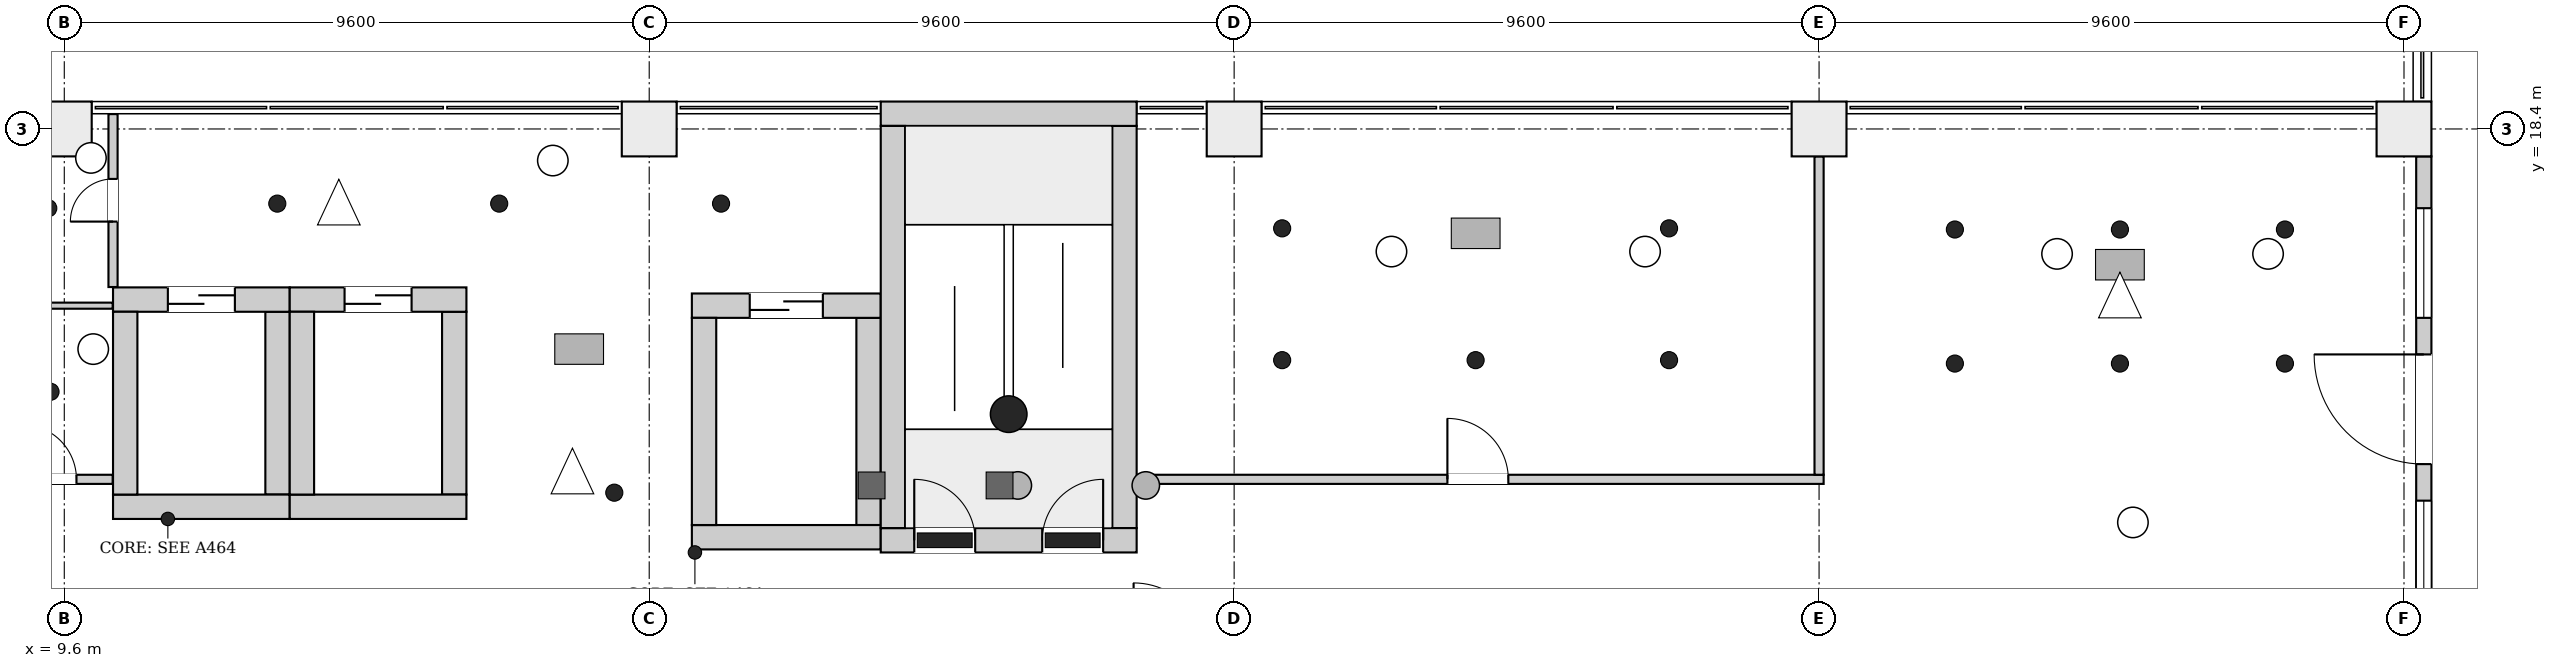
"""IFC4 building model, lengths in metres.
Left out: names, types, materials, properties, quantities, classifications, styles, units other than length and angle.
Written with IfcOpenShell. Run it as: python <this file> out.ifc"""

import sys

from ifc_helpers import new_model, si_unit, direction, frame, frame_2d, origin, origin_2d, place, context, subcontext, project, spatial, rectangle, extrude, element, fill, save


model = new_model("IFC4")
c1 = context("Model", 3, precision=1e-05, world=origin(), true_north=direction((0.0, 1.0)))
c2 = subcontext(c1, "Body", "Model", "MODEL_VIEW")
j1 = project(units=[si_unit("LENGTHUNIT", "METRE"), si_unit("PLANEANGLEUNIT", "RADIAN")], contexts=[c1])
p1 = place(None, origin())
s1 = spatial("IfcSite", under=j1, at=p1, CompositionType="ELEMENT")
p2 = place(p1, origin())
s2 = spatial("IfcBuilding", under=s1, at=p2, CompositionType="ELEMENT")
p3 = place(p2, frame((0.0, 0.0, 31.9)))
s3 = spatial("IfcBuildingStorey", under=s2, at=p3, CompositionType="ELEMENT", Elevation=31.9)
p4 = place(p3, frame((23.0, 11.65, 0.0), z_axis=(0.0, 0.0, 1.0), x_axis=(1.0, 0.0, 0.0)))
e1 = element("IfcWall", 1, at=p4, inside=s3, PredefinedType="SHEAR", context=c2, shape_type="SweptSolid", body=[
    extrude(rectangle(XDim=4.2, YDim=0.4, at=frame_2d((2.1, 0.0))), origin(), (0.0, 0.0, 1.0), 4.2),
])
p5 = place(p4, frame((0.55, 0.0, 0.0)))
e2 = element("IfcOpeningElement", 2, at=p5, cuts=e1, PredefinedType="OPENING", context=c2, shape_type="SweptSolid", body=[
    extrude(rectangle(XDim=1.0, YDim=2.1, at=frame_2d((0.5, 1.05))), frame((0.0, 0.21, 0.0), z_axis=(0.0, -1.0, 0.0), x_axis=(1.0, 0.0, 0.0)), (0.0, 0.0, 1.0), 0.42),
])
p6 = place(p4, frame((2.65, 0.0, 0.0)))
e3 = element("IfcOpeningElement", 3, at=p6, cuts=e1, PredefinedType="OPENING", context=c2, shape_type="SweptSolid", body=[
    extrude(rectangle(XDim=1.0, YDim=2.1, at=frame_2d((0.5, 1.05))), frame((0.0, 0.21, 0.0), z_axis=(0.0, -1.0, 0.0), x_axis=(1.0, 0.0, 0.0)), (0.0, 0.0, 1.0), 0.42),
])
p7 = place(p3, frame((23.0, 18.65, 0.0), z_axis=(0.0, 0.0, 1.0), x_axis=(1.0, 0.0, 0.0)))
e4 = element("IfcWall", 4, at=p7, inside=s3, PredefinedType="SHEAR", context=c2, shape_type="SweptSolid", body=[
    extrude(rectangle(XDim=4.2, YDim=0.4, at=frame_2d((2.1, 0.0))), origin(), (0.0, 0.0, 1.0), 4.2),
])
for number, where, z_axis, x_axis in (
    (5, (23.2, 11.85, 0.0), (0.0, 0.0, 1.0), (0.0, 1.0, 0.0)),
    (6, (27.0, 11.85, 0.0), (0.0, 0.0, 1.0), (0.0, 1.0, 0.0)),
):
    element("IfcWall", number, at=place(p3, frame(where, z_axis=z_axis, x_axis=x_axis)), inside=s3, PredefinedType="SHEAR", context=c2, shape_type="SweptSolid", body=[
        extrude(rectangle(XDim=6.6, YDim=0.4, at=frame_2d((3.3, 0.0))), origin(), (0.0, 0.0, 1.0), 4.2),
    ])
p8 = place(p3, frame((10.4, 12.2, 0.0), z_axis=(0.0, 0.0, 1.0), x_axis=(1.0, 0.0, 0.0)))
e7 = element("IfcWall", 7, at=p8, inside=s3, PredefinedType="SHEAR", context=c2, shape_type="SweptSolid", body=[
    extrude(rectangle(XDim=2.9, YDim=0.4, at=frame_2d((1.45, 0.0))), origin(), (0.0, 0.0, 1.0), 4.2),
])
p9 = place(p3, frame((10.4, 15.6, 0.0), z_axis=(0.0, 0.0, 1.0), x_axis=(1.0, 0.0, 0.0)))
e8 = element("IfcWall", 8, at=p9, inside=s3, PredefinedType="SHEAR", context=c2, shape_type="SweptSolid", body=[
    extrude(rectangle(XDim=2.9, YDim=0.4, at=frame_2d((1.45, 0.0))), origin(), (0.0, 0.0, 1.0), 4.2),
])
p10 = place(p9, frame((0.9, 0.0, 0.0)))
e9 = element("IfcOpeningElement", 9, at=p10, cuts=e8, PredefinedType="OPENING", context=c2, shape_type="SweptSolid", body=[
    extrude(rectangle(XDim=1.1, YDim=2.1, at=frame_2d((0.55, 1.05))), frame((0.0, 0.21, 0.0), z_axis=(0.0, -1.0, 0.0), x_axis=(1.0, 0.0, 0.0)), (0.0, 0.0, 1.0), 0.42),
])
for number, where, z_axis, x_axis in (
    (10, (10.6, 12.4, 0.0), (0.0, 0.0, 1.0), (0.0, 1.0, 0.0)),
    (11, (13.1, 12.4, 0.0), (0.0, 0.0, 1.0), (0.0, 1.0, 0.0)),
):
    element("IfcWall", number, at=place(p3, frame(where, z_axis=z_axis, x_axis=x_axis)), inside=s3, PredefinedType="SHEAR", context=c2, shape_type="SweptSolid", body=[
        extrude(rectangle(XDim=3.0, YDim=0.4, at=frame_2d((1.5, 0.0))), origin(), (0.0, 0.0, 1.0), 4.2),
    ])
p11 = place(p3, frame((13.3, 12.2, 0.0), z_axis=(0.0, 0.0, 1.0), x_axis=(1.0, 0.0, 0.0)))
e12 = element("IfcWall", 12, at=p11, inside=s3, PredefinedType="SHEAR", context=c2, shape_type="SweptSolid", body=[
    extrude(rectangle(XDim=2.9, YDim=0.4, at=frame_2d((1.45, 0.0))), origin(), (0.0, 0.0, 1.0), 4.2),
])
p12 = place(p3, frame((13.3, 15.6, 0.0), z_axis=(0.0, 0.0, 1.0), x_axis=(1.0, 0.0, 0.0)))
e13 = element("IfcWall", 13, at=p12, inside=s3, PredefinedType="SHEAR", context=c2, shape_type="SweptSolid", body=[
    extrude(rectangle(XDim=2.9, YDim=0.4, at=frame_2d((1.45, 0.0))), origin(), (0.0, 0.0, 1.0), 4.2),
])
p13 = place(p12, frame((0.9, 0.0, 0.0)))
e14 = element("IfcOpeningElement", 14, at=p13, cuts=e13, PredefinedType="OPENING", context=c2, shape_type="SweptSolid", body=[
    extrude(rectangle(XDim=1.1, YDim=2.1, at=frame_2d((0.55, 1.05))), frame((0.0, 0.21, 0.0), z_axis=(0.0, -1.0, 0.0), x_axis=(1.0, 0.0, 0.0)), (0.0, 0.0, 1.0), 0.42),
])
for number, where, z_axis, x_axis in (
    (15, (13.5, 12.4, 0.0), (0.0, 0.0, 1.0), (0.0, 1.0, 0.0)),
    (16, (16.0, 12.4, 0.0), (0.0, 0.0, 1.0), (0.0, 1.0, 0.0)),
):
    element("IfcWall", number, at=place(p3, frame(where, z_axis=z_axis, x_axis=x_axis)), inside=s3, PredefinedType="SHEAR", context=c2, shape_type="SweptSolid", body=[
        extrude(rectangle(XDim=3.0, YDim=0.4, at=frame_2d((1.5, 0.0))), origin(), (0.0, 0.0, 1.0), 4.2),
    ])
p14 = place(p3, frame((19.9, 11.7, 0.0), z_axis=(0.0, 0.0, 1.0), x_axis=(1.0, 0.0, 0.0)))
e17 = element("IfcWall", 17, at=p14, inside=s3, PredefinedType="SHEAR", context=c2, shape_type="SweptSolid", body=[
    extrude(rectangle(XDim=3.1, YDim=0.4, at=frame_2d((1.55, 0.0))), origin(), (0.0, 0.0, 1.0), 4.2),
])
p15 = place(p3, frame((19.9, 15.5, 0.0), z_axis=(0.0, 0.0, 1.0), x_axis=(1.0, 0.0, 0.0)))
e18 = element("IfcWall", 18, at=p15, inside=s3, PredefinedType="SHEAR", context=c2, shape_type="SweptSolid", body=[
    extrude(rectangle(XDim=3.1, YDim=0.4, at=frame_2d((1.55, 0.0))), origin(), (0.0, 0.0, 1.0), 4.2),
])
p16 = place(p15, frame((0.95, 0.0, 0.0)))
e19 = element("IfcOpeningElement", 19, at=p16, cuts=e18, PredefinedType="OPENING", context=c2, shape_type="SweptSolid", body=[
    extrude(rectangle(XDim=1.2, YDim=2.1, at=frame_2d((0.6, 1.05))), frame((0.0, 0.21, 0.0), z_axis=(0.0, -1.0, 0.0), x_axis=(1.0, 0.0, 0.0)), (0.0, 0.0, 1.0), 0.42),
])
for number, where, z_axis, x_axis in (
    (20, (20.1, 11.9, 0.0), (0.0, 0.0, 1.0), (0.0, 1.0, 0.0)),
    (21, (22.8, 11.9, 0.0), (0.0, 0.0, 1.0), (0.0, 1.0, 0.0)),
):
    element("IfcWall", number, at=place(p3, frame(where, z_axis=z_axis, x_axis=x_axis)), inside=s3, PredefinedType="SHEAR", context=c2, shape_type="SweptSolid", body=[
        extrude(rectangle(XDim=3.4, YDim=0.4, at=frame_2d((1.7, 0.0))), origin(), (0.0, 0.0, 1.0), 4.2),
    ])
for number, where, z_axis, x_axis in (
    (22, (9.6, 18.4, 0.0), (0.0, 0.0, 1.0), (1.0, 0.0, 0.0)),
    (23, (19.2, 18.4, 0.0), (0.0, 0.0, 1.0), (1.0, 0.0, 0.0)),
    (24, (28.8, 18.4, 0.0), (0.0, 0.0, 1.0), (1.0, 0.0, 0.0)),
    (25, (38.4, 18.4, 0.0), (0.0, 0.0, 1.0), (1.0, 0.0, 0.0)),
    (26, (48.0, 18.4, 0.0), (0.0, 0.0, 1.0), (1.0, 0.0, 0.0)),
):
    element("IfcColumn", number, at=place(p3, frame(where, z_axis=z_axis, x_axis=x_axis)), inside=s3, PredefinedType="COLUMN", context=c2, shape_type="SweptSolid", body=[
        extrude(rectangle(XDim=0.9, YDim=0.9, at=origin_2d()), origin(), (0.0, 0.0, 1.0), 4.2),
    ])
p17 = place(p3, frame((48.325, 9.65, 0.0), z_axis=(0.0, 0.0, 1.0), x_axis=(0.0, 1.0, 0.0)))
e27 = element("IfcWall", 27, at=p17, inside=s3, PredefinedType="ELEMENTEDWALL", context=c2, shape_type="SweptSolid", body=[
    extrude(rectangle(XDim=8.3, YDim=0.25, at=frame_2d((4.15, 0.0))), origin(), (0.0, 0.0, 1.0), 3.9),
])
p18 = place(p17, frame((3.25, 0.0, 0.0)))
e28 = element("IfcOpeningElement", 28, at=p18, cuts=e27, PredefinedType="OPENING", context=c2, shape_type="SweptSolid", body=[
    extrude(rectangle(XDim=1.8, YDim=2.4, at=frame_2d((0.9, 1.2))), frame((0.0, 0.135, 0.0), z_axis=(0.0, -1.0, 0.0), x_axis=(1.0, 0.0, 0.0)), (0.0, 0.0, 1.0), 0.27),
])
p19 = place(p17, frame((0.85, 0.0, 0.9)))
e29 = element("IfcOpeningElement", 29, at=p19, cuts=e27, PredefinedType="OPENING", context=c2, shape_type="SweptSolid", body=[
    extrude(rectangle(XDim=1.8, YDim=2.6, at=frame_2d((0.9, 1.3))), frame((0.0, 0.135, 0.0), z_axis=(0.0, -1.0, 0.0), x_axis=(1.0, 0.0, 0.0)), (0.0, 0.0, 1.0), 0.27),
])
p20 = place(p17, frame((5.65, 0.0, 0.9)))
e30 = element("IfcOpeningElement", 30, at=p20, cuts=e27, PredefinedType="OPENING", context=c2, shape_type="SweptSolid", body=[
    extrude(rectangle(XDim=1.8, YDim=2.6, at=frame_2d((0.9, 1.3))), frame((0.0, 0.135, 0.0), z_axis=(0.0, -1.0, 0.0), x_axis=(1.0, 0.0, 0.0)), (0.0, 0.0, 1.0), 0.27),
])
p21 = place(p3, frame((6.125, 12.65, 0.0), z_axis=(0.0, 0.0, 1.0), x_axis=(1.0, 0.0, 0.0)))
e31 = element("IfcWall", 31, at=p21, inside=s3, PredefinedType="PARTITIONING", context=c2, shape_type="SweptSolid", body=[
    extrude(rectangle(XDim=4.269, YDim=0.15, at=frame_2d((2.135, 0.0))), origin(), (0.0, 0.0, 1.0), 3.9),
])
p22 = place(p21, frame((2.775, 0.0, 0.0)))
e32 = element("IfcOpeningElement", 32, at=p22, cuts=e31, PredefinedType="OPENING", context=c2, shape_type="SweptSolid", body=[
    extrude(rectangle(XDim=0.9, YDim=2.1, at=frame_2d((0.45, 1.05))), frame((0.0, 0.085, 0.0), z_axis=(0.0, -1.0, 0.0), x_axis=(1.0, 0.0, 0.0)), (0.0, 0.0, 1.0), 0.17),
])
p23 = place(p3, frame((6.275, 15.5, 0.0), z_axis=(0.0, 0.0, 1.0), x_axis=(1.0, 0.0, 0.0)))
e33 = element("IfcWall", 33, at=p23, inside=s3, PredefinedType="PARTITIONING", context=c2, shape_type="SweptSolid", body=[
    extrude(rectangle(XDim=4.119, YDim=0.1, at=frame_2d((2.06, 0.0))), origin(), (0.0, 0.0, 1.0), 3.9),
])
p24 = place(p3, frame((10.4, 15.806, 0.0), z_axis=(0.0, 0.0, 1.0), x_axis=(0.0, 1.0, 0.0)))
e34 = element("IfcWall", 34, at=p24, inside=s3, PredefinedType="PARTITIONING", context=c2, shape_type="SweptSolid", body=[
    extrude(rectangle(XDim=2.838, YDim=0.15, at=frame_2d((1.419, 0.0))), origin(), (0.0, 0.0, 1.0), 3.9),
])
p25 = place(p24, frame((1.074, 0.0, 0.0)))
e35 = element("IfcOpeningElement", 35, at=p25, cuts=e34, PredefinedType="OPENING", context=c2, shape_type="SweptSolid", body=[
    extrude(rectangle(XDim=0.7, YDim=2.1, at=frame_2d((0.35, 1.05))), frame((0.0, 0.085, 0.0), z_axis=(0.0, -1.0, 0.0), x_axis=(1.0, 0.0, 0.0)), (0.0, 0.0, 1.0), 0.17),
])
p26 = place(p3, frame((27.206, 12.65, 0.0), z_axis=(0.0, 0.0, 1.0), x_axis=(1.0, 0.0, 0.0)))
e36 = element("IfcWall", 36, at=p26, inside=s3, PredefinedType="PARTITIONING", context=c2, shape_type="SweptSolid", body=[
    extrude(rectangle(XDim=11.269, YDim=0.15, at=frame_2d((5.635, 0.0))), origin(), (0.0, 0.0, 1.0), 3.9),
])
p27 = place(p26, frame((5.094, 0.0, 0.0)))
e37 = element("IfcOpeningElement", 37, at=p27, cuts=e36, PredefinedType="OPENING", context=c2, shape_type="SweptSolid", body=[
    extrude(rectangle(XDim=1.0, YDim=2.1, at=frame_2d((0.5, 1.05))), frame((0.0, 0.085, 0.0), z_axis=(0.0, -1.0, 0.0), x_axis=(1.0, 0.0, 0.0)), (0.0, 0.0, 1.0), 0.17),
])
p28 = place(p3, frame((38.4, 12.725, 0.0), z_axis=(0.0, 0.0, 1.0), x_axis=(0.0, 1.0, 0.0)))
e38 = element("IfcWall", 38, at=p28, inside=s3, PredefinedType="PARTITIONING", context=c2, shape_type="SweptSolid", body=[
    extrude(rectangle(XDim=5.225, YDim=0.15, at=frame_2d((2.612, 0.0))), origin(), (0.0, 0.0, 1.0), 3.9),
])
p29 = place(p18, frame((1.8, 0.0, 0.0), z_axis=(0.0, 0.0, 1.0), x_axis=(-1.0, 0.0, 0.0)))
e39 = element("IfcDoor", 39, at=p29, inside=s3, OperationType="DOUBLE_DOOR_SINGLE_SWING", PredefinedType="DOOR", context=c2, shape_type="SweptSolid", body=[
    extrude(rectangle(XDim=1.8, YDim=2.4, at=frame_2d((0.9, 1.2))), frame((0.0, 0.025, 0.0), z_axis=(0.0, -1.0, 0.0), x_axis=(1.0, 0.0, 0.0)), (0.0, 0.0, 1.0), 0.05),
])
fill(e28, e39)
p30 = place(p19, origin())
e40 = element("IfcWindow", 40, at=p30, inside=s3, PartitioningType="SINGLE_PANEL", PredefinedType="WINDOW", context=c2, shape_type="SweptSolid", body=[
    extrude(rectangle(XDim=1.8, YDim=2.6, at=frame_2d((0.9, 1.3))), frame((0.0, 0.03, 0.0), z_axis=(0.0, -1.0, 0.0), x_axis=(1.0, 0.0, 0.0)), (0.0, 0.0, 1.0), 0.06),
])
fill(e29, e40)
p31 = place(p20, origin())
e41 = element("IfcWindow", 41, at=p31, inside=s3, PartitioningType="SINGLE_PANEL", PredefinedType="WINDOW", context=c2, shape_type="SweptSolid", body=[
    extrude(rectangle(XDim=1.8, YDim=2.6, at=frame_2d((0.9, 1.3))), frame((0.0, 0.03, 0.0), z_axis=(0.0, -1.0, 0.0), x_axis=(1.0, 0.0, 0.0)), (0.0, 0.0, 1.0), 0.06),
])
fill(e30, e41)
p32 = place(p5, origin())
e42 = element("IfcDoor", 42, at=p32, inside=s3, OperationType="SINGLE_SWING_RIGHT", PredefinedType="DOOR", context=c2, shape_type="SweptSolid", body=[
    extrude(rectangle(XDim=1.0, YDim=2.1, at=frame_2d((0.5, 1.05))), frame((0.0, 0.025, 0.0), z_axis=(0.0, -1.0, 0.0), x_axis=(1.0, 0.0, 0.0)), (0.0, 0.0, 1.0), 0.05),
])
fill(e2, e42)
p33 = place(p6, origin())
e43 = element("IfcDoor", 43, at=p33, inside=s3, OperationType="SINGLE_SWING_LEFT", PredefinedType="DOOR", context=c2, shape_type="SweptSolid", body=[
    extrude(rectangle(XDim=1.0, YDim=2.1, at=frame_2d((0.5, 1.05))), frame((0.0, 0.025, 0.0), z_axis=(0.0, -1.0, 0.0), x_axis=(1.0, 0.0, 0.0)), (0.0, 0.0, 1.0), 0.05),
])
fill(e3, e43)
p34 = place(p10, origin())
e44 = element("IfcDoor", 44, at=p34, inside=s3, OperationType="DOUBLE_DOOR_SLIDING", PredefinedType="DOOR", context=c2, shape_type="SweptSolid", body=[
    extrude(rectangle(XDim=1.1, YDim=2.1, at=frame_2d((0.55, 1.05))), frame((0.0, 0.025, 0.0), z_axis=(0.0, -1.0, 0.0), x_axis=(1.0, 0.0, 0.0)), (0.0, 0.0, 1.0), 0.05),
])
fill(e9, e44)
p35 = place(p13, origin())
e45 = element("IfcDoor", 45, at=p35, inside=s3, OperationType="DOUBLE_DOOR_SLIDING", PredefinedType="DOOR", context=c2, shape_type="SweptSolid", body=[
    extrude(rectangle(XDim=1.1, YDim=2.1, at=frame_2d((0.55, 1.05))), frame((0.0, 0.025, 0.0), z_axis=(0.0, -1.0, 0.0), x_axis=(1.0, 0.0, 0.0)), (0.0, 0.0, 1.0), 0.05),
])
fill(e14, e45)
p36 = place(p16, origin())
e46 = element("IfcDoor", 46, at=p36, inside=s3, OperationType="DOUBLE_DOOR_SLIDING", PredefinedType="DOOR", context=c2, shape_type="SweptSolid", body=[
    extrude(rectangle(XDim=1.2, YDim=2.1, at=frame_2d((0.6, 1.05))), frame((0.0, 0.025, 0.0), z_axis=(0.0, -1.0, 0.0), x_axis=(1.0, 0.0, 0.0)), (0.0, 0.0, 1.0), 0.05),
])
fill(e19, e46)
p37 = place(p22, origin())
e47 = element("IfcDoor", 47, at=p37, inside=s3, OperationType="SINGLE_SWING_RIGHT", PredefinedType="DOOR", context=c2, shape_type="SweptSolid", body=[
    extrude(rectangle(XDim=0.9, YDim=2.1, at=frame_2d((0.45, 1.05))), frame((0.0, 0.025, 0.0), z_axis=(0.0, -1.0, 0.0), x_axis=(1.0, 0.0, 0.0)), (0.0, 0.0, 1.0), 0.05),
])
fill(e32, e47)
p38 = place(p25, origin())
e48 = element("IfcDoor", 48, at=p38, inside=s3, OperationType="SINGLE_SWING_LEFT", PredefinedType="DOOR", context=c2, shape_type="SweptSolid", body=[
    extrude(rectangle(XDim=0.7, YDim=2.1, at=frame_2d((0.35, 1.05))), frame((0.0, 0.025, 0.0), z_axis=(0.0, -1.0, 0.0), x_axis=(1.0, 0.0, 0.0)), (0.0, 0.0, 1.0), 0.05),
])
fill(e35, e48)
p39 = place(p27, origin())
e49 = element("IfcDoor", 49, at=p39, inside=s3, OperationType="SINGLE_SWING_LEFT", PredefinedType="DOOR", context=c2, shape_type="SweptSolid", body=[
    extrude(rectangle(XDim=1.0, YDim=2.1, at=frame_2d((0.5, 1.05))), frame((0.0, 0.025, 0.0), z_axis=(0.0, -1.0, 0.0), x_axis=(1.0, 0.0, 0.0)), (0.0, 0.0, 1.0), 0.05),
])
fill(e37, e49)
save(model, sys.argv[1])
